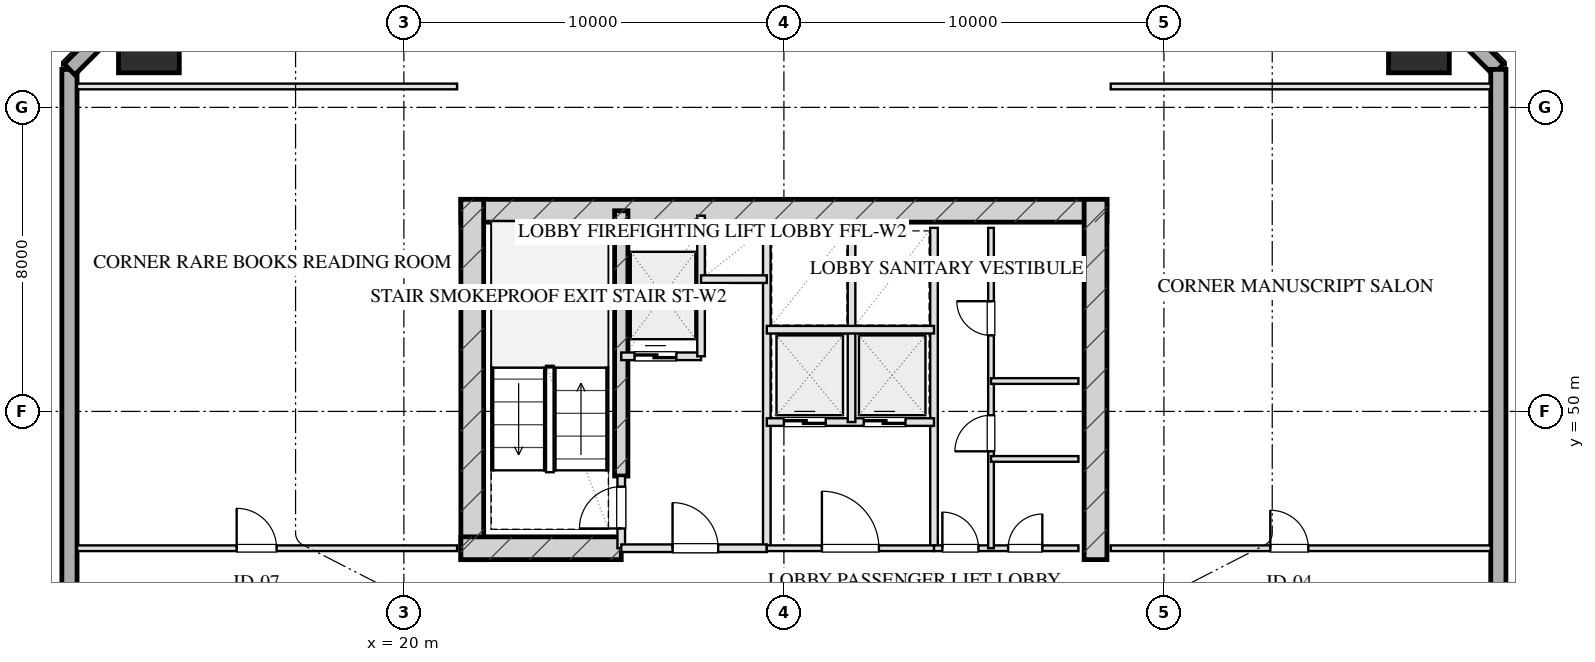
"""IFC4 building model, lengths in metres.
Left out: names, types, materials, properties, quantities, classifications, styles, units other than length and angle.
Written with IfcOpenShell. Run it as: python <this file> out.ifc"""

import sys

from ifc_helpers import new_model, si_unit, direction, frame, frame_2d, origin, origin_2d, place, context, subcontext, project, spatial, rectangle, hollow_rectangle, extrude, element, fill, save


model = new_model("IFC4")
c1 = context("Model", 3, precision=1e-05, world=origin(), true_north=direction((0.0, 1.0)))
c2 = subcontext(c1, "Body", "Model", "MODEL_VIEW")
j1 = project(units=[si_unit("LENGTHUNIT", "METRE"), si_unit("PLANEANGLEUNIT", "RADIAN")], contexts=[c1])
p1 = place(None, origin())
s1 = spatial("IfcSite", under=j1, at=p1, CompositionType="ELEMENT")
p2 = place(p1, origin())
s2 = spatial("IfcBuilding", under=s1, at=p2, CompositionType="ELEMENT")
p3 = place(p2, frame((0.0, 0.0, 96.6)))
s3 = spatial("IfcBuildingStorey", under=s2, at=p3, CompositionType="ELEMENT", Elevation=96.6)
p4 = place(p3, frame((21.5, 55.28, 0.0), z_axis=(0.0, 0.0, 1.0), x_axis=(1.0, 0.0, 0.0)))
e1 = element("IfcWall", 1, at=p4, inside=s3, PredefinedType="SHEAR", context=c2, shape_type="SweptSolid", body=[
    extrude(rectangle(XDim=17.0, YDim=0.6, at=frame_2d((8.5, 0.0))), origin(), (0.0, 0.0, 1.0), 3.45),
])
for number, where, z_axis, x_axis in (
    (2, (21.8, 46.1, 0.0), (0.0, 0.0, 1.0), (0.0, 1.0, 0.0)),
    (3, (38.2, 46.1, 0.0), (0.0, 0.0, 1.0), (0.0, 1.0, 0.0)),
):
    element("IfcWall", number, at=place(p3, frame(where, z_axis=z_axis, x_axis=x_axis)), inside=s3, PredefinedType="SHEAR", context=c2, shape_type="SweptSolid", body=[
        extrude(rectangle(XDim=9.48, YDim=0.6, at=frame_2d((4.74, 0.0))), origin(), (0.0, 0.0, 1.0), 3.45),
    ])
p5 = place(p3, frame((25.72, 48.3, 0.0), z_axis=(0.0, 0.0, 1.0), x_axis=(0.0, 1.0, 0.0)))
e4 = element("IfcWall", 4, at=p5, inside=s3, PredefinedType="SHEAR", context=c2, shape_type="SweptSolid", body=[
    extrude(rectangle(XDim=6.98, YDim=0.35, at=frame_2d((3.49, 0.0))), origin(), (0.0, 0.0, 1.0), 3.45),
])
p6 = place(p3, frame((21.5, 46.4, 0.0), z_axis=(0.0, 0.0, 1.0), x_axis=(1.0, 0.0, 0.0)))
e5 = element("IfcWall", 5, at=p6, inside=s3, PredefinedType="SHEAR", context=c2, shape_type="SweptSolid", body=[
    extrude(rectangle(XDim=4.22, YDim=0.6, at=frame_2d((2.11, 0.0))), origin(), (0.0, 0.0, 1.0), 3.45),
])
for number, where, z_axis, x_axis in (
    (6, (46.71, 59.71, 0.0), (0.0, 0.0, 1.0), (1.0, 0.0, 0.0)),
    (7, (13.29, 59.71, 0.0), (0.0, 0.0, 1.0), (1.0, 0.0, 0.0)),
):
    element("IfcColumn", number, at=place(p3, frame(where, z_axis=z_axis, x_axis=x_axis)), inside=s3, PredefinedType="COLUMN", context=c2, shape_type="SweptSolid", body=[
        extrude(hollow_rectangle(XDim=1.6, YDim=1.6, WallThickness=0.055, at=origin_2d()), origin(), (0.0, 0.0, 1.0), 3.451),
    ])
p7 = place(p3, frame((11.2, 9.0, 0.0), z_axis=(0.0, 0.0, 1.0), x_axis=(0.0, 1.0, 0.0)))
e8 = element("IfcWall", 8, at=p7, inside=s3, PredefinedType="SOLIDWALL", context=c2, shape_type="SweptSolid", body=[
    extrude(rectangle(XDim=50.0, YDim=0.4, at=frame_2d((25.0, 0.0))), origin(), (0.0, 0.0, 1.0), 2.55),
])
p8 = place(p7, frame((21.2, 0.0, 0.75)))
e9 = element("IfcOpeningElement", 9, at=p8, cuts=e8, PredefinedType="OPENING", context=c2, shape_type="SweptSolid", body=[
    extrude(rectangle(XDim=2.4, YDim=1.4, at=frame_2d((1.2, 0.7))), frame((0.0, 0.21, 0.0), z_axis=(0.0, -1.0, 0.0), x_axis=(1.0, 0.0, 0.0)), (0.0, 0.0, 1.0), 0.42),
])
p9 = place(p7, frame((26.4, 0.0, 0.75)))
e10 = element("IfcOpeningElement", 10, at=p9, cuts=e8, PredefinedType="OPENING", context=c2, shape_type="SweptSolid", body=[
    extrude(rectangle(XDim=2.4, YDim=1.4, at=frame_2d((1.2, 0.7))), frame((0.0, 0.21, 0.0), z_axis=(0.0, -1.0, 0.0), x_axis=(1.0, 0.0, 0.0)), (0.0, 0.0, 1.0), 0.42),
])
for number, where, z_axis, x_axis in (
    (11, (11.2, 59.0, 0.0), (0.0, 0.0, 1.0), (0.707, 0.707, 0.0)),
    (12, (46.0, 61.8, 0.0), (0.0, 0.0, 1.0), (0.707, -0.707, 0.0)),
):
    element("IfcWall", number, at=place(p3, frame(where, z_axis=z_axis, x_axis=x_axis)), inside=s3, PredefinedType="SOLIDWALL", context=c2, shape_type="SweptSolid", body=[
        extrude(rectangle(XDim=3.96, YDim=0.4, at=frame_2d((1.98, 0.0))), origin(), (0.0, 0.0, 1.0), 2.55),
    ])
p10 = place(p3, frame((48.8, 59.0, 0.0), z_axis=(0.0, 0.0, 1.0), x_axis=(0.0, -1.0, 0.0)))
e13 = element("IfcWall", 13, at=p10, inside=s3, PredefinedType="SOLIDWALL", context=c2, shape_type="SweptSolid", body=[
    extrude(rectangle(XDim=50.0, YDim=0.4, at=frame_2d((25.0, 0.0))), origin(), (0.0, 0.0, 1.0), 2.55),
])
p11 = place(p3, frame((25.72, 46.4, 0.0), z_axis=(0.0, 0.0, 1.0), x_axis=(0.0, 1.0, 0.0)))
e14 = element("IfcWall", 14, at=p11, inside=s3, PredefinedType="PARTITIONING", context=c2, shape_type="SweptSolid", body=[
    extrude(rectangle(XDim=1.9, YDim=0.2, at=frame_2d((0.95, 0.0))), origin(), (0.0, 0.0, 1.0), 3.155),
])
p12 = place(p11, frame((0.52, 0.0, 0.0)))
e15 = element("IfcOpeningElement", 15, at=p12, cuts=e14, PredefinedType="OPENING", context=c2, shape_type="SweptSolid", body=[
    extrude(rectangle(XDim=1.1, YDim=2.05, at=frame_2d((0.55, 1.025))), frame((0.0, 0.11, 0.0), z_axis=(0.0, -1.0, 0.0), x_axis=(1.0, 0.0, 0.0)), (0.0, 0.0, 1.0), 0.22),
])
p13 = place(p3, frame((29.55, 46.4, 0.0), z_axis=(0.0, 0.0, 1.0), x_axis=(0.0, 1.0, 0.0)))
e16 = element("IfcWall", 16, at=p13, inside=s3, PredefinedType="PARTITIONING", context=c2, shape_type="SweptSolid", body=[
    extrude(rectangle(XDim=8.43, YDim=0.2, at=frame_2d((4.215, 0.0))), origin(), (0.0, 0.0, 1.0), 3.155),
])
p14 = place(p3, frame((25.72, 46.4, 0.0), z_axis=(0.0, 0.0, 1.0), x_axis=(1.0, 0.0, 0.0)))
e17 = element("IfcWall", 17, at=p14, inside=s3, PredefinedType="PARTITIONING", context=c2, shape_type="SweptSolid", body=[
    extrude(rectangle(XDim=3.83, YDim=0.2, at=frame_2d((1.915, 0.0))), origin(), (0.0, 0.0, 1.0), 3.155),
])
p15 = place(p14, frame((1.35, 0.0, 0.0)))
e18 = element("IfcOpeningElement", 18, at=p15, cuts=e17, PredefinedType="OPENING", context=c2, shape_type="SweptSolid", body=[
    extrude(rectangle(XDim=1.2, YDim=2.05, at=frame_2d((0.6, 1.025))), frame((0.0, 0.11, 0.0), z_axis=(0.0, -1.0, 0.0), x_axis=(1.0, 0.0, 0.0)), (0.0, 0.0, 1.0), 0.22),
])
p16 = place(p3, frame((25.72, 51.45, 0.0), z_axis=(0.0, 0.0, 1.0), x_axis=(1.0, 0.0, 0.0)))
e19 = element("IfcWall", 19, at=p16, inside=s3, PredefinedType="PARTITIONING", context=c2, shape_type="SweptSolid", body=[
    extrude(rectangle(XDim=2.1, YDim=0.2, at=frame_2d((1.05, 0.0))), origin(), (0.0, 0.0, 1.0), 3.155),
])
p17 = place(p16, frame((0.35, 0.0, 0.0)))
e20 = element("IfcOpeningElement", 20, at=p17, cuts=e19, PredefinedType="OPENING", context=c2, shape_type="SweptSolid", body=[
    extrude(rectangle(XDim=1.1, YDim=2.05, at=frame_2d((0.55, 1.025))), frame((0.0, 0.11, 0.0), z_axis=(0.0, -1.0, 0.0), x_axis=(1.0, 0.0, 0.0)), (0.0, 0.0, 1.0), 0.22),
])
p18 = place(p3, frame((27.82, 51.45, 0.0), z_axis=(0.0, 0.0, 1.0), x_axis=(0.0, 1.0, 0.0)))
e21 = element("IfcWall", 21, at=p18, inside=s3, PredefinedType="PARTITIONING", context=c2, shape_type="SweptSolid", body=[
    extrude(rectangle(XDim=3.7, YDim=0.2, at=frame_2d((1.85, 0.0))), origin(), (0.0, 0.0, 1.0), 3.155),
])
p19 = place(p3, frame((27.82, 53.48, 0.0), z_axis=(0.0, 0.0, 1.0), x_axis=(1.0, 0.0, 0.0)))
e22 = element("IfcWall", 22, at=p19, inside=s3, PredefinedType="PARTITIONING", context=c2, shape_type="SweptSolid", body=[
    extrude(rectangle(XDim=1.73, YDim=0.2, at=frame_2d((0.865, 0.0))), origin(), (0.0, 0.0, 1.0), 3.155),
])
p20 = place(p3, frame((33.95, 46.4, 0.0), z_axis=(0.0, 0.0, 1.0), x_axis=(0.0, 1.0, 0.0)))
e23 = element("IfcWall", 23, at=p20, inside=s3, PredefinedType="PARTITIONING", context=c2, shape_type="SweptSolid", body=[
    extrude(rectangle(XDim=8.43, YDim=0.2, at=frame_2d((4.215, 0.0))), origin(), (0.0, 0.0, 1.0), 3.155),
])
p21 = place(p3, frame((29.55, 46.4, 0.0), z_axis=(0.0, 0.0, 1.0), x_axis=(1.0, 0.0, 0.0)))
e24 = element("IfcWall", 24, at=p21, inside=s3, PredefinedType="PARTITIONING", context=c2, shape_type="SweptSolid", body=[
    extrude(rectangle(XDim=4.4, YDim=0.15, at=frame_2d((2.2, 0.0))), origin(), (0.0, 0.0, 1.0), 3.155),
])
p22 = place(p21, frame((1.45, 0.0, 0.0)))
e25 = element("IfcOpeningElement", 25, at=p22, cuts=e24, PredefinedType="OPENING", context=c2, shape_type="SweptSolid", body=[
    extrude(rectangle(XDim=1.5, YDim=2.05, at=frame_2d((0.75, 1.025))), frame((0.0, 0.085, 0.0), z_axis=(0.0, -1.0, 0.0), x_axis=(1.0, 0.0, 0.0)), (0.0, 0.0, 1.0), 0.17),
])
p23 = place(p3, frame((29.55, 49.72, 0.0), z_axis=(0.0, 0.0, 1.0), x_axis=(1.0, 0.0, 0.0)))
e26 = element("IfcWall", 26, at=p23, inside=s3, PredefinedType="PARTITIONING", context=c2, shape_type="SweptSolid", body=[
    extrude(rectangle(XDim=4.4, YDim=0.2, at=frame_2d((2.2, 0.0))), origin(), (0.0, 0.0, 1.0), 3.155),
])
p24 = place(p23, frame((0.45, 0.0, 0.0)))
e27 = element("IfcOpeningElement", 27, at=p24, cuts=e26, PredefinedType="OPENING", context=c2, shape_type="SweptSolid", body=[
    extrude(rectangle(XDim=1.1, YDim=2.05, at=frame_2d((0.55, 1.025))), frame((0.0, 0.11, 0.0), z_axis=(0.0, -1.0, 0.0), x_axis=(1.0, 0.0, 0.0)), (0.0, 0.0, 1.0), 0.22),
])
p25 = place(p23, frame((2.55, 0.0, 0.0)))
e28 = element("IfcOpeningElement", 28, at=p25, cuts=e26, PredefinedType="OPENING", context=c2, shape_type="SweptSolid", body=[
    extrude(rectangle(XDim=1.1, YDim=2.05, at=frame_2d((0.55, 1.025))), frame((0.0, 0.11, 0.0), z_axis=(0.0, -1.0, 0.0), x_axis=(1.0, 0.0, 0.0)), (0.0, 0.0, 1.0), 0.22),
])
p26 = place(p3, frame((31.78, 49.72, 0.0), z_axis=(0.0, 0.0, 1.0), x_axis=(0.0, 1.0, 0.0)))
e29 = element("IfcWall", 29, at=p26, inside=s3, PredefinedType="PARTITIONING", context=c2, shape_type="SweptSolid", body=[
    extrude(rectangle(XDim=5.11, YDim=0.2, at=frame_2d((2.555, 0.0))), origin(), (0.0, 0.0, 1.0), 3.155),
])
p27 = place(p3, frame((29.55, 52.15, 0.0), z_axis=(0.0, 0.0, 1.0), x_axis=(1.0, 0.0, 0.0)))
e30 = element("IfcWall", 30, at=p27, inside=s3, PredefinedType="PARTITIONING", context=c2, shape_type="SweptSolid", body=[
    extrude(rectangle(XDim=4.4, YDim=0.2, at=frame_2d((2.2, 0.0))), origin(), (0.0, 0.0, 1.0), 3.155),
])
p28 = place(p3, frame((33.95, 46.4, 0.0), z_axis=(0.0, 0.0, 1.0), x_axis=(1.0, 0.0, 0.0)))
e31 = element("IfcWall", 31, at=p28, inside=s3, PredefinedType="PARTITIONING", context=c2, shape_type="SweptSolid", body=[
    extrude(rectangle(XDim=3.8, YDim=0.15, at=frame_2d((1.9, 0.0))), origin(), (0.0, 0.0, 1.0), 3.155),
])
p29 = place(p28, frame((0.22, 0.0, 0.0)))
e32 = element("IfcOpeningElement", 32, at=p29, cuts=e31, PredefinedType="OPENING", context=c2, shape_type="SweptSolid", body=[
    extrude(rectangle(XDim=0.95, YDim=2.05, at=frame_2d((0.475, 1.025))), frame((0.0, 0.085, 0.0), z_axis=(0.0, -1.0, 0.0), x_axis=(1.0, 0.0, 0.0)), (0.0, 0.0, 1.0), 0.17),
])
p30 = place(p28, frame((1.95, 0.0, 0.0)))
e33 = element("IfcOpeningElement", 33, at=p30, cuts=e31, PredefinedType="OPENING", context=c2, shape_type="SweptSolid", body=[
    extrude(rectangle(XDim=0.9, YDim=2.05, at=frame_2d((0.45, 1.025))), frame((0.0, 0.085, 0.0), z_axis=(0.0, -1.0, 0.0), x_axis=(1.0, 0.0, 0.0)), (0.0, 0.0, 1.0), 0.17),
])
p31 = place(p3, frame((35.45, 46.4, 0.0), z_axis=(0.0, 0.0, 1.0), x_axis=(0.0, 1.0, 0.0)))
e34 = element("IfcWall", 34, at=p31, inside=s3, PredefinedType="PARTITIONING", context=c2, shape_type="SweptSolid", body=[
    extrude(rectangle(XDim=8.43, YDim=0.15, at=frame_2d((4.215, 0.0))), origin(), (0.0, 0.0, 1.0), 2.765),
])
p32 = place(p31, frame((2.55, 0.0, 0.0)))
e35 = element("IfcOpeningElement", 35, at=p32, cuts=e34, PredefinedType="OPENING", context=c2, shape_type="SweptSolid", body=[
    extrude(rectangle(XDim=0.95, YDim=2.05, at=frame_2d((0.475, 1.025))), frame((0.0, 0.085, 0.0), z_axis=(0.0, -1.0, 0.0), x_axis=(1.0, 0.0, 0.0)), (0.0, 0.0, 1.0), 0.17),
])
p33 = place(p31, frame((5.6, 0.0, 0.0)))
e36 = element("IfcOpeningElement", 36, at=p33, cuts=e34, PredefinedType="OPENING", context=c2, shape_type="SweptSolid", body=[
    extrude(rectangle(XDim=0.9, YDim=2.05, at=frame_2d((0.45, 1.025))), frame((0.0, 0.085, 0.0), z_axis=(0.0, -1.0, 0.0), x_axis=(1.0, 0.0, 0.0)), (0.0, 0.0, 1.0), 0.17),
])
for number, where, z_axis, x_axis in (
    (37, (35.45, 50.8, 0.0), (0.0, 0.0, 1.0), (1.0, 0.0, 0.0)),
    (38, (35.45, 48.75, 0.0), (0.0, 0.0, 1.0), (1.0, 0.0, 0.0)),
):
    element("IfcWall", number, at=place(p3, frame(where, z_axis=z_axis, x_axis=x_axis)), inside=s3, PredefinedType="PARTITIONING", context=c2, shape_type="SweptSolid", body=[
        extrude(rectangle(XDim=2.3, YDim=0.15, at=frame_2d((1.15, 0.0))), origin(), (0.0, 0.0, 1.0), 3.155),
    ])
p34 = place(p3, frame((11.4, 58.55, 0.0), z_axis=(0.0, 0.0, 1.0), x_axis=(1.0, 0.0, 0.0)))
e39 = element("IfcWall", 39, at=p34, inside=s3, PredefinedType="PARTITIONING", context=c2, shape_type="SweptSolid", body=[
    extrude(rectangle(XDim=10.0, YDim=0.15, at=frame_2d((5.0, 0.0))), origin(), (0.0, 0.0, 1.0), 3.155),
])
p35 = place(p3, frame((11.4, 46.4, 0.0), z_axis=(0.0, 0.0, 1.0), x_axis=(1.0, 0.0, 0.0)))
e40 = element("IfcWall", 40, at=p35, inside=s3, PredefinedType="PARTITIONING", context=c2, shape_type="SweptSolid", body=[
    extrude(rectangle(XDim=10.0, YDim=0.15, at=frame_2d((5.0, 0.0))), origin(), (0.0, 0.0, 1.0), 3.155),
])
p36 = place(p35, frame((4.2, 0.0, 0.0)))
e41 = element("IfcOpeningElement", 41, at=p36, cuts=e40, PredefinedType="OPENING", context=c2, shape_type="SweptSolid", body=[
    extrude(rectangle(XDim=1.05, YDim=2.05, at=frame_2d((0.525, 1.025))), frame((0.0, 0.085, 0.0), z_axis=(0.0, -1.0, 0.0), x_axis=(1.0, 0.0, 0.0)), (0.0, 0.0, 1.0), 0.17),
])
p37 = place(p3, frame((38.6, 58.55, 0.0), z_axis=(0.0, 0.0, 1.0), x_axis=(1.0, 0.0, 0.0)))
e42 = element("IfcWall", 42, at=p37, inside=s3, PredefinedType="PARTITIONING", context=c2, shape_type="SweptSolid", body=[
    extrude(rectangle(XDim=10.0, YDim=0.15, at=frame_2d((5.0, 0.0))), origin(), (0.0, 0.0, 1.0), 3.155),
])
p38 = place(p3, frame((38.6, 46.4, 0.0), z_axis=(0.0, 0.0, 1.0), x_axis=(1.0, 0.0, 0.0)))
e43 = element("IfcWall", 43, at=p38, inside=s3, PredefinedType="PARTITIONING", context=c2, shape_type="SweptSolid", body=[
    extrude(rectangle(XDim=10.0, YDim=0.15, at=frame_2d((5.0, 0.0))), origin(), (0.0, 0.0, 1.0), 3.155),
])
p39 = place(p38, frame((4.2, 0.0, 0.0)))
e44 = element("IfcOpeningElement", 44, at=p39, cuts=e43, PredefinedType="OPENING", context=c2, shape_type="SweptSolid", body=[
    extrude(rectangle(XDim=1.0, YDim=2.05, at=frame_2d((0.5, 1.025))), frame((0.0, 0.085, 0.0), z_axis=(0.0, -1.0, 0.0), x_axis=(1.0, 0.0, 0.0)), (0.0, 0.0, 1.0), 0.17),
])
p40 = place(p12, origin())
e45 = element("IfcDoor", 45, at=p40, inside=s3, OperationType="SINGLE_SWING_LEFT", PredefinedType="DOOR", context=c2, shape_type="SweptSolid", body=[
    extrude(rectangle(XDim=1.1, YDim=2.05, at=frame_2d((0.55, 1.025))), frame((0.0, 0.025, 0.0), z_axis=(0.0, -1.0, 0.0), x_axis=(1.0, 0.0, 0.0)), (0.0, 0.0, 1.0), 0.05),
])
fill(e15, e45)
p41 = place(p15, origin())
e46 = element("IfcDoor", 46, at=p41, inside=s3, OperationType="SINGLE_SWING_LEFT", PredefinedType="DOOR", context=c2, shape_type="SweptSolid", body=[
    extrude(rectangle(XDim=1.2, YDim=2.05, at=frame_2d((0.6, 1.025))), frame((0.0, 0.025, 0.0), z_axis=(0.0, -1.0, 0.0), x_axis=(1.0, 0.0, 0.0)), (0.0, 0.0, 1.0), 0.05),
])
fill(e18, e46)
p42 = place(p17, origin())
e47 = element("IfcDoor", 47, at=p42, inside=s3, OperationType="DOUBLE_DOOR_SLIDING", PredefinedType="DOOR", context=c2, shape_type="SweptSolid", body=[
    extrude(rectangle(XDim=1.1, YDim=2.05, at=frame_2d((0.55, 1.025))), frame((0.0, 0.025, 0.0), z_axis=(0.0, -1.0, 0.0), x_axis=(1.0, 0.0, 0.0)), (0.0, 0.0, 1.0), 0.05),
])
fill(e20, e47)
p43 = place(p22, origin())
e48 = element("IfcDoor", 48, at=p43, inside=s3, OperationType="SINGLE_SWING_LEFT", PredefinedType="DOOR", context=c2, shape_type="SweptSolid", body=[
    extrude(rectangle(XDim=1.5, YDim=2.05, at=frame_2d((0.75, 1.025))), frame((0.0, 0.025, 0.0), z_axis=(0.0, -1.0, 0.0), x_axis=(1.0, 0.0, 0.0)), (0.0, 0.0, 1.0), 0.05),
])
fill(e25, e48)
p44 = place(p24, origin())
e49 = element("IfcDoor", 49, at=p44, inside=s3, OperationType="DOUBLE_DOOR_SLIDING", PredefinedType="DOOR", context=c2, shape_type="SweptSolid", body=[
    extrude(rectangle(XDim=1.1, YDim=2.05, at=frame_2d((0.55, 1.025))), frame((0.0, 0.025, 0.0), z_axis=(0.0, -1.0, 0.0), x_axis=(1.0, 0.0, 0.0)), (0.0, 0.0, 1.0), 0.05),
])
fill(e27, e49)
p45 = place(p25, origin())
e50 = element("IfcDoor", 50, at=p45, inside=s3, OperationType="DOUBLE_DOOR_SLIDING", PredefinedType="DOOR", context=c2, shape_type="SweptSolid", body=[
    extrude(rectangle(XDim=1.1, YDim=2.05, at=frame_2d((0.55, 1.025))), frame((0.0, 0.025, 0.0), z_axis=(0.0, -1.0, 0.0), x_axis=(1.0, 0.0, 0.0)), (0.0, 0.0, 1.0), 0.05),
])
fill(e28, e50)
p46 = place(p29, origin())
e51 = element("IfcDoor", 51, at=p46, inside=s3, OperationType="SINGLE_SWING_LEFT", PredefinedType="DOOR", context=c2, shape_type="SweptSolid", body=[
    extrude(rectangle(XDim=0.95, YDim=2.05, at=frame_2d((0.475, 1.025))), frame((0.0, 0.025, 0.0), z_axis=(0.0, -1.0, 0.0), x_axis=(1.0, 0.0, 0.0)), (0.0, 0.0, 1.0), 0.05),
])
fill(e32, e51)
p47 = place(p30, origin())
e52 = element("IfcDoor", 52, at=p47, inside=s3, OperationType="SINGLE_SWING_RIGHT", PredefinedType="DOOR", context=c2, shape_type="SweptSolid", body=[
    extrude(rectangle(XDim=0.9, YDim=2.05, at=frame_2d((0.45, 1.025))), frame((0.0, 0.025, 0.0), z_axis=(0.0, -1.0, 0.0), x_axis=(1.0, 0.0, 0.0)), (0.0, 0.0, 1.0), 0.05),
])
fill(e33, e52)
p48 = place(p32, origin())
e53 = element("IfcDoor", 53, at=p48, inside=s3, OperationType="SINGLE_SWING_LEFT", PredefinedType="DOOR", context=c2, shape_type="SweptSolid", body=[
    extrude(rectangle(XDim=0.95, YDim=2.05, at=frame_2d((0.475, 1.025))), frame((0.0, 0.025, 0.0), z_axis=(0.0, -1.0, 0.0), x_axis=(1.0, 0.0, 0.0)), (0.0, 0.0, 1.0), 0.05),
])
fill(e35, e53)
p49 = place(p33, origin())
e54 = element("IfcDoor", 54, at=p49, inside=s3, OperationType="SINGLE_SWING_RIGHT", PredefinedType="DOOR", context=c2, shape_type="SweptSolid", body=[
    extrude(rectangle(XDim=0.9, YDim=2.05, at=frame_2d((0.45, 1.025))), frame((0.0, 0.025, 0.0), z_axis=(0.0, -1.0, 0.0), x_axis=(1.0, 0.0, 0.0)), (0.0, 0.0, 1.0), 0.05),
])
fill(e36, e54)
p50 = place(p36, origin())
e55 = element("IfcDoor", 55, at=p50, inside=s3, OperationType="SINGLE_SWING_LEFT", PredefinedType="DOOR", context=c2, shape_type="SweptSolid", body=[
    extrude(rectangle(XDim=1.05, YDim=2.05, at=frame_2d((0.525, 1.025))), frame((0.0, 0.025, 0.0), z_axis=(0.0, -1.0, 0.0), x_axis=(1.0, 0.0, 0.0)), (0.0, 0.0, 1.0), 0.05),
])
fill(e41, e55)
p51 = place(p39, origin())
e56 = element("IfcDoor", 56, at=p51, inside=s3, OperationType="SINGLE_SWING_LEFT", PredefinedType="DOOR", context=c2, shape_type="SweptSolid", body=[
    extrude(rectangle(XDim=1.0, YDim=2.05, at=frame_2d((0.5, 1.025))), frame((0.0, 0.025, 0.0), z_axis=(0.0, -1.0, 0.0), x_axis=(1.0, 0.0, 0.0)), (0.0, 0.0, 1.0), 0.05),
])
fill(e44, e56)
save(model, sys.argv[1])
